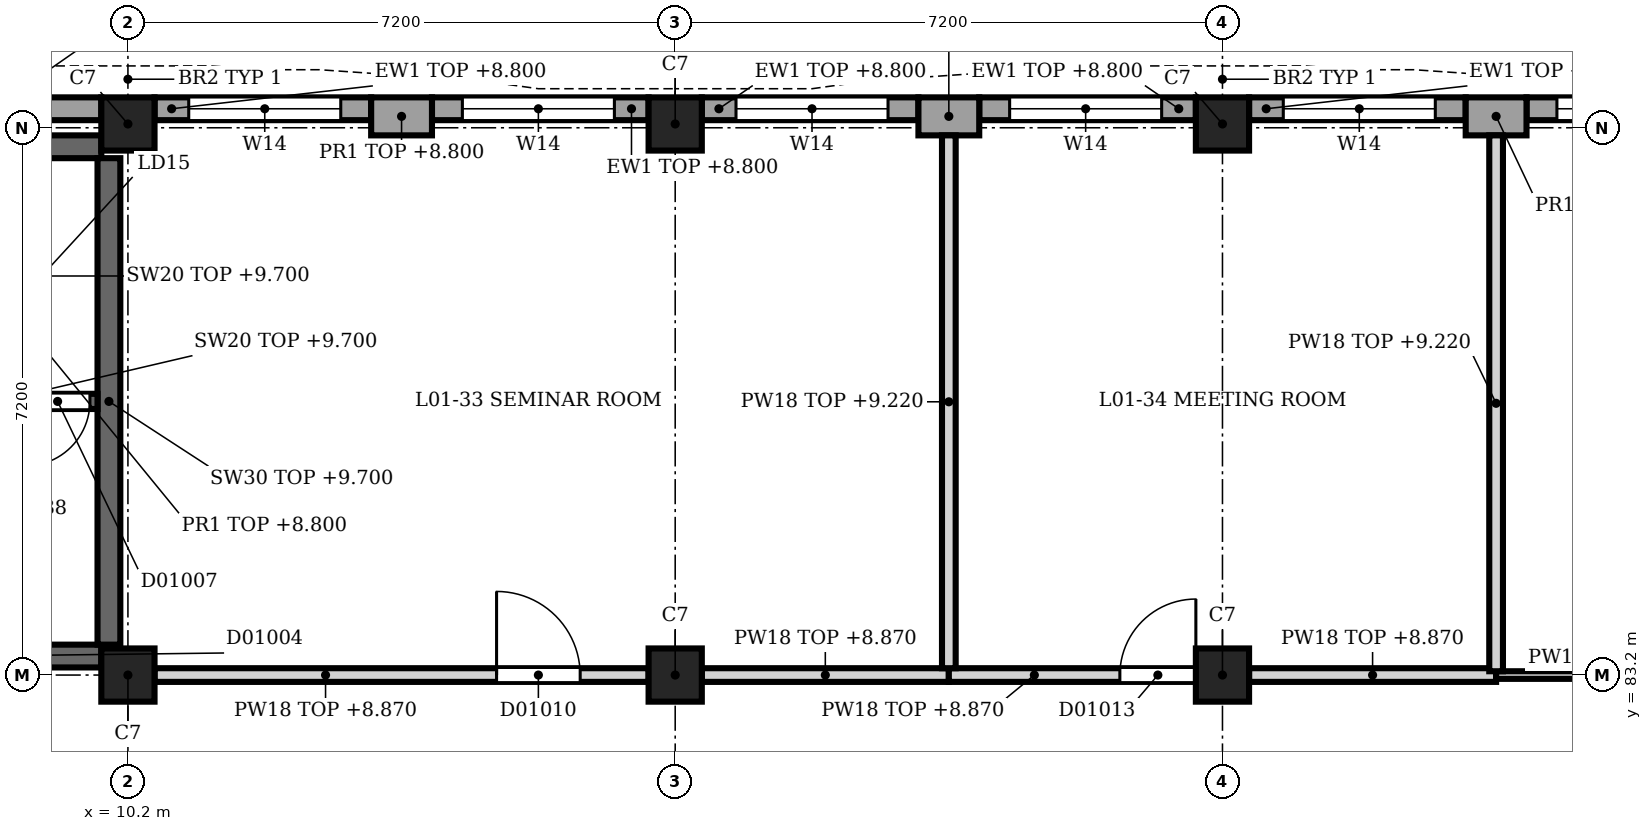
"""IFC4 building model, lengths in metres.
Left out: names, types, materials, properties, quantities, classifications, styles, units other than length and angle.
Written with IfcOpenShell. Run it as: python <this file> out.ifc"""

import sys

from ifc_helpers import new_model, si_unit, direction, frame, frame_2d, origin, origin_2d, place, context, subcontext, project, spatial, rectangle, extrude, element, fill, save


model = new_model("IFC4")
c1 = context("Model", 3, precision=1e-05, world=origin(), true_north=direction((0.0, 1.0)))
c2 = subcontext(c1, "Body", "Model", "MODEL_VIEW")
j1 = project(units=[si_unit("LENGTHUNIT", "METRE"), si_unit("PLANEANGLEUNIT", "RADIAN")], contexts=[c1])
p1 = place(None, origin())
s1 = spatial("IfcSite", under=j1, at=p1, CompositionType="ELEMENT")
p2 = place(p1, origin())
s2 = spatial("IfcBuilding", under=s1, at=p2, CompositionType="ELEMENT")
p3 = place(p2, frame((0.0, 0.0, 5.4)))
s3 = spatial("IfcBuildingStorey", under=s2, at=p3, CompositionType="ELEMENT", Elevation=5.4)
for number, where, z_axis, x_axis in (
    (1, (10.2, 83.2, 0.0), (0.0, 0.0, 1.0), (1.0, 0.0, 0.0)),
    (2, (10.2, 90.45, 0.0), (0.0, 0.0, 1.0), (1.0, 0.0, 0.0)),
    (3, (17.4, 83.2, 0.0), (0.0, 0.0, 1.0), (1.0, 0.0, 0.0)),
    (4, (17.4, 90.45, 0.0), (0.0, 0.0, 1.0), (1.0, 0.0, 0.0)),
    (5, (24.6, 83.2, 0.0), (0.0, 0.0, 1.0), (1.0, 0.0, 0.0)),
    (6, (24.6, 90.45, 0.0), (0.0, 0.0, 1.0), (1.0, 0.0, 0.0)),
):
    element("IfcColumn", number, at=place(p3, frame(where, z_axis=z_axis, x_axis=x_axis)), inside=s3, PredefinedType="COLUMN", context=c2, shape_type="SweptSolid", body=[
        extrude(rectangle(XDim=0.7, YDim=0.7, at=origin_2d()), origin(), (0.0, 0.0, 1.0), 4.5),
    ])
p4 = place(p3, frame((13.4, 90.55, 0.0), z_axis=(0.0, 0.0, 1.0), x_axis=(1.0, 0.0, 0.0)))
e7 = element("IfcWall", 7, at=p4, inside=s3, PredefinedType="SOLIDWALL", context=c2, shape_type="SweptSolid", body=[
    extrude(rectangle(XDim=0.8, YDim=0.5, at=frame_2d((0.4, 0.0))), origin(), (0.0, 0.0, 1.0), 3.4),
])
p5 = place(p3, frame((20.6, 90.55, 0.0), z_axis=(0.0, 0.0, 1.0), x_axis=(1.0, 0.0, 0.0)))
e8 = element("IfcWall", 8, at=p5, inside=s3, PredefinedType="SOLIDWALL", context=c2, shape_type="SweptSolid", body=[
    extrude(rectangle(XDim=0.8, YDim=0.5, at=frame_2d((0.4, 0.0))), origin(), (0.0, 0.0, 1.0), 3.4),
])
p6 = place(p3, frame((27.8, 90.55, 0.0), z_axis=(0.0, 0.0, 1.0), x_axis=(1.0, 0.0, 0.0)))
e9 = element("IfcWall", 9, at=p6, inside=s3, PredefinedType="SOLIDWALL", context=c2, shape_type="SweptSolid", body=[
    extrude(rectangle(XDim=0.8, YDim=0.5, at=frame_2d((0.4, 0.0))), origin(), (0.0, 0.0, 1.0), 3.4),
])
p7 = place(p3, frame((7.0, 90.65, 0.0), z_axis=(0.0, 0.0, 1.0), x_axis=(1.0, 0.0, 0.0)))
e10 = element("IfcWall", 10, at=p7, inside=s3, PredefinedType="SOLIDWALL", context=c2, shape_type="SweptSolid", body=[
    extrude(rectangle(XDim=2.85, YDim=0.3, at=frame_2d((1.425, 0.0))), origin(), (0.0, 0.0, 1.0), 3.4),
])
p8 = place(p3, frame((10.55, 90.65, 0.0), z_axis=(0.0, 0.0, 1.0), x_axis=(1.0, 0.0, 0.0)))
e11 = element("IfcWall", 11, at=p8, inside=s3, PredefinedType="SOLIDWALL", context=c2, shape_type="SweptSolid", body=[
    extrude(rectangle(XDim=2.85, YDim=0.3, at=frame_2d((1.425, 0.0))), origin(), (0.0, 0.0, 1.0), 3.4),
])
p9 = place(p8, frame((0.45, 0.0, 0.9)))
e12 = element("IfcOpeningElement", 12, at=p9, cuts=e11, PredefinedType="OPENING", context=c2, shape_type="SweptSolid", body=[
    extrude(rectangle(XDim=2.0, YDim=2.4, at=frame_2d((1.0, 1.2))), frame((0.0, 0.16, 0.0), z_axis=(0.0, -1.0, 0.0), x_axis=(1.0, 0.0, 0.0)), (0.0, 0.0, 1.0), 0.32),
])
p10 = place(p3, frame((14.2, 90.65, 0.0), z_axis=(0.0, 0.0, 1.0), x_axis=(1.0, 0.0, 0.0)))
e13 = element("IfcWall", 13, at=p10, inside=s3, PredefinedType="SOLIDWALL", context=c2, shape_type="SweptSolid", body=[
    extrude(rectangle(XDim=2.85, YDim=0.3, at=frame_2d((1.425, 0.0))), origin(), (0.0, 0.0, 1.0), 3.4),
])
p11 = place(p10, frame((0.4, 0.0, 0.9)))
e14 = element("IfcOpeningElement", 14, at=p11, cuts=e13, PredefinedType="OPENING", context=c2, shape_type="SweptSolid", body=[
    extrude(rectangle(XDim=2.0, YDim=2.4, at=frame_2d((1.0, 1.2))), frame((0.0, 0.16, 0.0), z_axis=(0.0, -1.0, 0.0), x_axis=(1.0, 0.0, 0.0)), (0.0, 0.0, 1.0), 0.32),
])
p12 = place(p3, frame((17.75, 90.65, 0.0), z_axis=(0.0, 0.0, 1.0), x_axis=(1.0, 0.0, 0.0)))
e15 = element("IfcWall", 15, at=p12, inside=s3, PredefinedType="SOLIDWALL", context=c2, shape_type="SweptSolid", body=[
    extrude(rectangle(XDim=2.85, YDim=0.3, at=frame_2d((1.425, 0.0))), origin(), (0.0, 0.0, 1.0), 3.4),
])
p13 = place(p12, frame((0.45, 0.0, 0.9)))
e16 = element("IfcOpeningElement", 16, at=p13, cuts=e15, PredefinedType="OPENING", context=c2, shape_type="SweptSolid", body=[
    extrude(rectangle(XDim=2.0, YDim=2.4, at=frame_2d((1.0, 1.2))), frame((0.0, 0.16, 0.0), z_axis=(0.0, -1.0, 0.0), x_axis=(1.0, 0.0, 0.0)), (0.0, 0.0, 1.0), 0.32),
])
p14 = place(p3, frame((21.4, 90.65, 0.0), z_axis=(0.0, 0.0, 1.0), x_axis=(1.0, 0.0, 0.0)))
e17 = element("IfcWall", 17, at=p14, inside=s3, PredefinedType="SOLIDWALL", context=c2, shape_type="SweptSolid", body=[
    extrude(rectangle(XDim=2.85, YDim=0.3, at=frame_2d((1.425, 0.0))), origin(), (0.0, 0.0, 1.0), 3.4),
])
p15 = place(p14, frame((0.4, 0.0, 0.9)))
e18 = element("IfcOpeningElement", 18, at=p15, cuts=e17, PredefinedType="OPENING", context=c2, shape_type="SweptSolid", body=[
    extrude(rectangle(XDim=2.0, YDim=2.4, at=frame_2d((1.0, 1.2))), frame((0.0, 0.16, 0.0), z_axis=(0.0, -1.0, 0.0), x_axis=(1.0, 0.0, 0.0)), (0.0, 0.0, 1.0), 0.32),
])
p16 = place(p3, frame((24.95, 90.65, 0.0), z_axis=(0.0, 0.0, 1.0), x_axis=(1.0, 0.0, 0.0)))
e19 = element("IfcWall", 19, at=p16, inside=s3, PredefinedType="SOLIDWALL", context=c2, shape_type="SweptSolid", body=[
    extrude(rectangle(XDim=2.85, YDim=0.3, at=frame_2d((1.425, 0.0))), origin(), (0.0, 0.0, 1.0), 3.4),
])
p17 = place(p16, frame((0.45, 0.0, 0.9)))
e20 = element("IfcOpeningElement", 20, at=p17, cuts=e19, PredefinedType="OPENING", context=c2, shape_type="SweptSolid", body=[
    extrude(rectangle(XDim=2.0, YDim=2.4, at=frame_2d((1.0, 1.2))), frame((0.0, 0.16, 0.0), z_axis=(0.0, -1.0, 0.0), x_axis=(1.0, 0.0, 0.0)), (0.0, 0.0, 1.0), 0.32),
])
p18 = place(p3, frame((28.6, 90.65, 0.0), z_axis=(0.0, 0.0, 1.0), x_axis=(1.0, 0.0, 0.0)))
e21 = element("IfcWall", 21, at=p18, inside=s3, PredefinedType="SOLIDWALL", context=c2, shape_type="SweptSolid", body=[
    extrude(rectangle(XDim=2.85, YDim=0.3, at=frame_2d((1.425, 0.0))), origin(), (0.0, 0.0, 1.0), 3.4),
])
p19 = place(p18, frame((0.4, 0.0, 0.9)))
e22 = element("IfcOpeningElement", 22, at=p19, cuts=e21, PredefinedType="OPENING", context=c2, shape_type="SweptSolid", body=[
    extrude(rectangle(XDim=2.0, YDim=2.4, at=frame_2d((1.0, 1.2))), frame((0.0, 0.16, 0.0), z_axis=(0.0, -1.0, 0.0), x_axis=(1.0, 0.0, 0.0)), (0.0, 0.0, 1.0), 0.32),
])
p20 = place(p3, frame((3.3, 83.45, 0.0), z_axis=(0.0, 0.0, 1.0), x_axis=(1.0, 0.0, 0.0)))
e23 = element("IfcWall", 23, at=p20, inside=s3, PredefinedType="SHEAR", context=c2, shape_type="SweptSolid", body=[
    extrude(rectangle(XDim=6.55, YDim=0.3, at=frame_2d((3.275, 0.0))), origin(), (0.0, 0.0, 1.0), 4.3),
])
p21 = place(p20, frame((4.3, 0.0, 0.0)))
e24 = element("IfcOpeningElement", 24, at=p21, cuts=e23, PredefinedType="OPENING", context=c2, shape_type="SweptSolid", body=[
    extrude(rectangle(XDim=1.2, YDim=2.1, at=frame_2d((0.6, 1.05))), frame((0.0, 0.16, 0.0), z_axis=(0.0, -1.0, 0.0), x_axis=(1.0, 0.0, 0.0)), (0.0, 0.0, 1.0), 0.32),
])
p22 = place(p3, frame((3.3, 90.15, 0.0), z_axis=(0.0, 0.0, 1.0), x_axis=(1.0, 0.0, 0.0)))
e25 = element("IfcWall", 25, at=p22, inside=s3, PredefinedType="SHEAR", context=c2, shape_type="SweptSolid", body=[
    extrude(rectangle(XDim=6.55, YDim=0.3, at=frame_2d((3.275, 0.0))), origin(), (0.0, 0.0, 1.0), 4.3),
])
p23 = place(p22, frame((1.2, 0.0, 1.2)))
e26 = element("IfcOpeningElement", 26, at=p23, cuts=e25, PredefinedType="OPENING", context=c2, shape_type="SweptSolid", body=[
    extrude(rectangle(XDim=0.6, YDim=1.8, at=frame_2d((0.3, 0.9))), frame((0.0, 0.16, 0.0), z_axis=(0.0, -1.0, 0.0), x_axis=(1.0, 0.0, 0.0)), (0.0, 0.0, 1.0), 0.32),
])
p24 = place(p3, frame((9.95, 83.6, 0.0), z_axis=(0.0, 0.0, 1.0), x_axis=(0.0, 1.0, 0.0)))
e27 = element("IfcWall", 27, at=p24, inside=s3, PredefinedType="SHEAR", context=c2, shape_type="SweptSolid", body=[
    extrude(rectangle(XDim=6.4, YDim=0.3, at=frame_2d((3.2, 0.0))), origin(), (0.0, 0.0, 1.0), 4.3),
])
p25 = place(p3, frame((9.8, 86.8, 0.0), z_axis=(0.0, 0.0, 1.0), x_axis=(-1.0, 0.0, 0.0)))
e28 = element("IfcWall", 28, at=p25, inside=s3, PredefinedType="SHEAR", context=c2, shape_type="SweptSolid", body=[
    extrude(rectangle(XDim=3.25, YDim=0.2, at=frame_2d((1.625, 0.0))), origin(), (0.0, 0.0, 1.0), 4.3),
])
p26 = place(p25, frame((1.7, 0.0, 0.0)))
e29 = element("IfcOpeningElement", 29, at=p26, cuts=e28, PredefinedType="OPENING", context=c2, shape_type="SweptSolid", body=[
    extrude(rectangle(XDim=1.1, YDim=2.1, at=frame_2d((0.55, 1.05))), frame((0.0, 0.11, 0.0), z_axis=(0.0, -1.0, 0.0), x_axis=(1.0, 0.0, 0.0)), (0.0, 0.0, 1.0), 0.22),
])
p27 = place(p25, frame((0.1, 0.0, 0.0)))
e30 = element("IfcOpeningElement", 30, at=p27, cuts=e28, PredefinedType="OPENING", context=c2, shape_type="SweptSolid", body=[
    extrude(rectangle(XDim=0.85, YDim=2.1, at=frame_2d((0.425, 1.05))), frame((0.0, 0.11, 0.0), z_axis=(0.0, -1.0, 0.0), x_axis=(1.0, 0.0, 0.0)), (0.0, 0.0, 1.0), 0.22),
])
p28 = place(p3, frame((10.55, 83.2, 0.0), z_axis=(0.0, 0.0, 1.0), x_axis=(1.0, 0.0, 0.0)))
e31 = element("IfcWall", 31, at=p28, inside=s3, PredefinedType="PARTITIONING", context=c2, shape_type="SweptSolid", body=[
    extrude(rectangle(XDim=6.5, YDim=0.18, at=frame_2d((3.25, 0.0))), origin(), (0.0, 0.0, 1.0), 3.47),
])
p29 = place(p28, frame((4.5, 0.0, 0.0)))
e32 = element("IfcOpeningElement", 32, at=p29, cuts=e31, PredefinedType="OPENING", context=c2, shape_type="SweptSolid", body=[
    extrude(rectangle(XDim=1.1, YDim=2.3, at=frame_2d((0.55, 1.15))), frame((0.0, 0.1, 0.0), z_axis=(0.0, -1.0, 0.0), x_axis=(1.0, 0.0, 0.0)), (0.0, 0.0, 1.0), 0.2),
])
p30 = place(p3, frame((17.75, 83.2, 0.0), z_axis=(0.0, 0.0, 1.0), x_axis=(1.0, 0.0, 0.0)))
e33 = element("IfcWall", 33, at=p30, inside=s3, PredefinedType="PARTITIONING", context=c2, shape_type="SweptSolid", body=[
    extrude(rectangle(XDim=3.25, YDim=0.18, at=frame_2d((1.625, 0.0))), origin(), (0.0, 0.0, 1.0), 3.47),
])
p31 = place(p3, frame((21.0, 83.2, 0.0), z_axis=(0.0, 0.0, 1.0), x_axis=(1.0, 0.0, 0.0)))
e34 = element("IfcWall", 34, at=p31, inside=s3, PredefinedType="PARTITIONING", context=c2, shape_type="SweptSolid", body=[
    extrude(rectangle(XDim=3.25, YDim=0.18, at=frame_2d((1.625, 0.0))), origin(), (0.0, 0.0, 1.0), 3.47),
])
p32 = place(p31, frame((2.25, 0.0, 0.0)))
e35 = element("IfcOpeningElement", 35, at=p32, cuts=e34, PredefinedType="OPENING", context=c2, shape_type="SweptSolid", body=[
    extrude(rectangle(XDim=1.0, YDim=2.1, at=frame_2d((0.5, 1.05))), frame((0.0, 0.1, 0.0), z_axis=(0.0, -1.0, 0.0), x_axis=(1.0, 0.0, 0.0)), (0.0, 0.0, 1.0), 0.2),
])
p33 = place(p3, frame((24.95, 83.2, 0.0), z_axis=(0.0, 0.0, 1.0), x_axis=(1.0, 0.0, 0.0)))
e36 = element("IfcWall", 36, at=p33, inside=s3, PredefinedType="PARTITIONING", context=c2, shape_type="SweptSolid", body=[
    extrude(rectangle(XDim=3.25, YDim=0.18, at=frame_2d((1.625, 0.0))), origin(), (0.0, 0.0, 1.0), 3.47),
])
p34 = place(p3, frame((28.2, 83.2, 0.0), z_axis=(0.0, 0.0, 1.0), x_axis=(1.0, 0.0, 0.0)))
e37 = element("IfcWall", 37, at=p34, inside=s3, PredefinedType="PARTITIONING", context=c2, shape_type="SweptSolid", body=[
    extrude(rectangle(XDim=3.25, YDim=0.1, at=frame_2d((1.625, 0.0))), origin(), (0.0, 0.0, 1.0), 3.47),
])
p35 = place(p3, frame((21.0, 83.29, 0.0), z_axis=(0.0, 0.0, 1.0), x_axis=(0.0, 1.0, 0.0)))
e38 = element("IfcWall", 38, at=p35, inside=s3, PredefinedType="PARTITIONING", context=c2, shape_type="SweptSolid", body=[
    extrude(rectangle(XDim=7.01, YDim=0.18, at=frame_2d((3.505, 0.0))), origin(), (0.0, 0.0, 1.0), 3.82),
])
p36 = place(p3, frame((28.2, 83.25, 0.0), z_axis=(0.0, 0.0, 1.0), x_axis=(0.0, 1.0, 0.0)))
e39 = element("IfcWall", 39, at=p36, inside=s3, PredefinedType="PARTITIONING", context=c2, shape_type="SweptSolid", body=[
    extrude(rectangle(XDim=7.05, YDim=0.18, at=frame_2d((3.525, 0.0))), origin(), (0.0, 0.0, 1.0), 3.82),
])
p37 = place(p9, origin())
e40 = element("IfcWindow", 40, at=p37, inside=s3, PartitioningType="SINGLE_PANEL", PredefinedType="WINDOW", context=c2, shape_type="SweptSolid", body=[
    extrude(rectangle(XDim=2.0, YDim=2.4, at=frame_2d((1.0, 1.2))), frame((0.0, 0.03, 0.0), z_axis=(0.0, -1.0, 0.0), x_axis=(1.0, 0.0, 0.0)), (0.0, 0.0, 1.0), 0.06),
])
fill(e12, e40)
p38 = place(p11, origin())
e41 = element("IfcWindow", 41, at=p38, inside=s3, PartitioningType="SINGLE_PANEL", PredefinedType="WINDOW", context=c2, shape_type="SweptSolid", body=[
    extrude(rectangle(XDim=2.0, YDim=2.4, at=frame_2d((1.0, 1.2))), frame((0.0, 0.03, 0.0), z_axis=(0.0, -1.0, 0.0), x_axis=(1.0, 0.0, 0.0)), (0.0, 0.0, 1.0), 0.06),
])
fill(e14, e41)
p39 = place(p13, origin())
e42 = element("IfcWindow", 42, at=p39, inside=s3, PartitioningType="SINGLE_PANEL", PredefinedType="WINDOW", context=c2, shape_type="SweptSolid", body=[
    extrude(rectangle(XDim=2.0, YDim=2.4, at=frame_2d((1.0, 1.2))), frame((0.0, 0.03, 0.0), z_axis=(0.0, -1.0, 0.0), x_axis=(1.0, 0.0, 0.0)), (0.0, 0.0, 1.0), 0.06),
])
fill(e16, e42)
p40 = place(p15, origin())
e43 = element("IfcWindow", 43, at=p40, inside=s3, PartitioningType="SINGLE_PANEL", PredefinedType="WINDOW", context=c2, shape_type="SweptSolid", body=[
    extrude(rectangle(XDim=2.0, YDim=2.4, at=frame_2d((1.0, 1.2))), frame((0.0, 0.03, 0.0), z_axis=(0.0, -1.0, 0.0), x_axis=(1.0, 0.0, 0.0)), (0.0, 0.0, 1.0), 0.06),
])
fill(e18, e43)
p41 = place(p17, origin())
e44 = element("IfcWindow", 44, at=p41, inside=s3, PartitioningType="SINGLE_PANEL", PredefinedType="WINDOW", context=c2, shape_type="SweptSolid", body=[
    extrude(rectangle(XDim=2.0, YDim=2.4, at=frame_2d((1.0, 1.2))), frame((0.0, 0.03, 0.0), z_axis=(0.0, -1.0, 0.0), x_axis=(1.0, 0.0, 0.0)), (0.0, 0.0, 1.0), 0.06),
])
fill(e20, e44)
p42 = place(p19, origin())
e45 = element("IfcWindow", 45, at=p42, inside=s3, PartitioningType="SINGLE_PANEL", PredefinedType="WINDOW", context=c2, shape_type="SweptSolid", body=[
    extrude(rectangle(XDim=2.0, YDim=2.4, at=frame_2d((1.0, 1.2))), frame((0.0, 0.03, 0.0), z_axis=(0.0, -1.0, 0.0), x_axis=(1.0, 0.0, 0.0)), (0.0, 0.0, 1.0), 0.06),
])
fill(e22, e45)
p43 = place(p27, origin())
e46 = element("IfcDoor", 46, at=p43, inside=s3, OperationType="SINGLE_SWING_LEFT", PredefinedType="DOOR", context=c2, shape_type="SweptSolid", body=[
    extrude(rectangle(XDim=0.85, YDim=2.1, at=frame_2d((0.425, 1.05))), frame((0.0, 0.025, 0.0), z_axis=(0.0, -1.0, 0.0), x_axis=(1.0, 0.0, 0.0)), (0.0, 0.0, 1.0), 0.05),
])
fill(e30, e46)
p44 = place(p29, origin())
e47 = element("IfcDoor", 47, at=p44, inside=s3, OperationType="SINGLE_SWING_RIGHT", PredefinedType="DOOR", context=c2, shape_type="SweptSolid", body=[
    extrude(rectangle(XDim=1.1, YDim=2.3, at=frame_2d((0.55, 1.15))), frame((0.0, 0.025, 0.0), z_axis=(0.0, -1.0, 0.0), x_axis=(1.0, 0.0, 0.0)), (0.0, 0.0, 1.0), 0.05),
])
fill(e32, e47)
p45 = place(p32, origin())
e48 = element("IfcDoor", 48, at=p45, inside=s3, OperationType="SINGLE_SWING_RIGHT", PredefinedType="DOOR", context=c2, shape_type="SweptSolid", body=[
    extrude(rectangle(XDim=1.0, YDim=2.1, at=frame_2d((0.5, 1.05))), frame((0.0, 0.025, 0.0), z_axis=(0.0, -1.0, 0.0), x_axis=(1.0, 0.0, 0.0)), (0.0, 0.0, 1.0), 0.05),
])
fill(e35, e48)
save(model, sys.argv[1])
